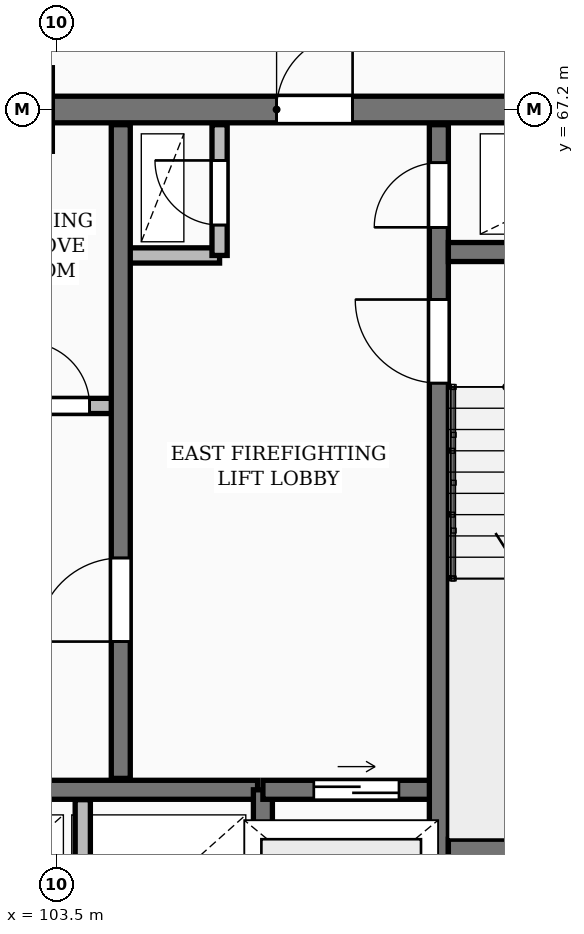
"""IFC4 building model, lengths in metres.
Left out: names, types, materials, properties, quantities, classifications, styles, units other than length and angle.
Written with IfcOpenShell. Run it as: python <this file> out.ifc"""

import sys

from ifc_helpers import new_model, si_unit, direction, frame, frame_2d, origin, place, context, subcontext, project, spatial, rectangle, extrude, element, fill, save


model = new_model("IFC4")
c1 = context("Model", 3, precision=1e-05, world=origin(), true_north=direction((0.0, 1.0)))
c2 = subcontext(c1, "Body", "Model", "MODEL_VIEW")
j1 = project(units=[si_unit("LENGTHUNIT", "METRE"), si_unit("PLANEANGLEUNIT", "RADIAN")], contexts=[c1])
p1 = place(None, origin())
s1 = spatial("IfcSite", under=j1, at=p1, CompositionType="ELEMENT")
p2 = place(p1, origin())
s2 = spatial("IfcBuilding", under=s1, at=p2, CompositionType="ELEMENT")
p3 = place(p2, frame((0.0, 0.0, -7.2)))
s3 = spatial("IfcBuildingStorey", under=s2, at=p3, CompositionType="ELEMENT", Elevation=-7.2)
p4 = place(p3, frame((75.95, 67.2, 0.0), z_axis=(0.0, 0.0, 1.0), x_axis=(1.0, 0.0, 0.0)))
e1 = element("IfcWall", 1, at=p4, inside=s3, PredefinedType="SHEAR", context=c2, shape_type="SweptSolid", body=[
    extrude(rectangle(XDim=36.3, YDim=0.35, at=frame_2d((18.15, 0.0))), origin(), (0.0, 0.0, 1.0), 3.6),
])
p5 = place(p4, frame((5.25, 0.0, 0.0)))
e2 = element("IfcOpeningElement", 2, at=p5, cuts=e1, PredefinedType="OPENING", context=c2, shape_type="SweptSolid", body=[
    extrude(rectangle(XDim=1.0, YDim=2.15, at=frame_2d((0.5, 1.075))), frame((0.0, 0.185, 0.0), z_axis=(0.0, -1.0, 0.0), x_axis=(1.0, 0.0, 0.0)), (0.0, 0.0, 1.0), 0.37),
])
p6 = place(p4, frame((21.6, 0.0, 0.0)))
e3 = element("IfcOpeningElement", 3, at=p6, cuts=e1, PredefinedType="OPENING", context=c2, shape_type="SweptSolid", body=[
    extrude(rectangle(XDim=1.5, YDim=2.2, at=frame_2d((0.75, 1.1))), frame((0.0, 0.185, 0.0), z_axis=(0.0, -1.0, 0.0), x_axis=(1.0, 0.0, 0.0)), (0.0, 0.0, 1.0), 0.37),
])
p7 = place(p4, frame((30.45, 0.0, 0.0)))
e4 = element("IfcOpeningElement", 4, at=p7, cuts=e1, PredefinedType="OPENING", context=c2, shape_type="SweptSolid", body=[
    extrude(rectangle(XDim=1.0, YDim=2.15, at=frame_2d((0.5, 1.075))), frame((0.0, 0.185, 0.0), z_axis=(0.0, -1.0, 0.0), x_axis=(1.0, 0.0, 0.0)), (0.0, 0.0, 1.0), 0.37),
])
p8 = place(p3, frame((103.85, 55.4, 0.0), z_axis=(0.0, 0.0, 1.0), x_axis=(0.0, 1.0, 0.0)))
e5 = element("IfcWall", 5, at=p8, inside=s3, PredefinedType="PARTITIONING", context=c2, shape_type="SweptSolid", body=[
    extrude(rectangle(XDim=2.72, YDim=0.2, at=frame_2d((1.36, 0.0))), origin(), (0.0, 0.0, 1.0), 3.3),
])
p9 = place(p3, frame((101.55, 58.25, 0.0), z_axis=(0.0, 0.0, 1.0), x_axis=(1.0, 0.0, 0.0)))
e6 = element("IfcWall", 6, at=p9, inside=s3, PredefinedType="SHEAR", context=c2, shape_type="SweptSolid", body=[
    extrude(rectangle(XDim=4.6, YDim=0.25, at=frame_2d((2.3, 0.0))), origin(), (0.0, 0.0, 1.0), 3.6),
])
p10 = place(p3, frame((106.22, 55.4, 0.0), z_axis=(0.0, 0.0, 1.0), x_axis=(0.0, 1.0, 0.0)))
e7 = element("IfcWall", 7, at=p10, inside=s3, PredefinedType="SHEAR", context=c2, shape_type="SweptSolid", body=[
    extrude(rectangle(XDim=2.85, YDim=0.25, at=frame_2d((1.425, 0.0))), origin(), (0.0, 0.0, 1.0), 3.6),
])
p11 = place(p3, frame((106.22, 58.25, 0.0), z_axis=(0.0, 0.0, 1.0), x_axis=(1.0, 0.0, 0.0)))
e8 = element("IfcWall", 8, at=p11, inside=s3, PredefinedType="SHEAR", context=c2, shape_type="SweptSolid", body=[
    extrude(rectangle(XDim=2.46, YDim=0.25, at=frame_2d((1.23, 0.0))), origin(), (0.0, 0.0, 1.0), 3.6),
])
p12 = place(p11, frame((0.67, 0.0, 0.0)))
e9 = element("IfcOpeningElement", 9, at=p12, cuts=e8, PredefinedType="OPENING", context=c2, shape_type="SweptSolid", body=[
    extrude(rectangle(XDim=1.12, YDim=2.12, at=frame_2d((0.56, 1.06))), frame((0.0, 0.135, 0.0), z_axis=(0.0, -1.0, 0.0), x_axis=(1.0, 0.0, 0.0)), (0.0, 0.0, 1.0), 0.27),
])
p13 = place(p3, frame((84.42, 63.3, 0.0), z_axis=(0.0, 0.0, 1.0), x_axis=(1.0, 0.0, 0.0)))
e10 = element("IfcWall", 10, at=p13, inside=s3, PredefinedType="PARTITIONING", context=c2, shape_type="SweptSolid", body=[
    extrude(rectangle(XDim=19.83, YDim=0.2, at=frame_2d((9.915, 0.0))), origin(), (0.0, 0.0, 1.0), 3.3),
])
p14 = place(p13, frame((1.15, 0.0, 0.0)))
e11 = element("IfcOpeningElement", 11, at=p14, cuts=e10, PredefinedType="OPENING", context=c2, shape_type="SweptSolid", body=[
    extrude(rectangle(XDim=0.85, YDim=2.05, at=frame_2d((0.425, 1.025))), frame((0.0, 0.11, 0.0), z_axis=(0.0, -1.0, 0.0), x_axis=(1.0, 0.0, 0.0)), (0.0, 0.0, 1.0), 0.22),
])
p15 = place(p13, frame((3.25, 0.0, 0.0)))
e12 = element("IfcOpeningElement", 12, at=p15, cuts=e10, PredefinedType="OPENING", context=c2, shape_type="SweptSolid", body=[
    extrude(rectangle(XDim=0.85, YDim=2.05, at=frame_2d((0.425, 1.025))), frame((0.0, 0.11, 0.0), z_axis=(0.0, -1.0, 0.0), x_axis=(1.0, 0.0, 0.0)), (0.0, 0.0, 1.0), 0.22),
])
p16 = place(p13, frame((13.08, 0.0, 0.0)))
e13 = element("IfcOpeningElement", 13, at=p16, cuts=e10, PredefinedType="OPENING", context=c2, shape_type="SweptSolid", body=[
    extrude(rectangle(XDim=1.5, YDim=2.2, at=frame_2d((0.75, 1.1))), frame((0.0, 0.11, 0.0), z_axis=(0.0, -1.0, 0.0), x_axis=(1.0, 0.0, 0.0)), (0.0, 0.0, 1.0), 0.22),
])
p17 = place(p13, frame((5.53, 0.0, 0.0)))
e14 = element("IfcOpeningElement", 14, at=p17, cuts=e10, PredefinedType="OPENING", context=c2, shape_type="SweptSolid", body=[
    extrude(rectangle(XDim=0.88, YDim=2.06, at=frame_2d((0.44, 1.03))), frame((0.0, 0.11, 0.0), z_axis=(0.0, -1.0, 0.0), x_axis=(1.0, 0.0, 0.0)), (0.0, 0.0, 1.0), 0.22),
])
p18 = place(p13, frame((7.68, 0.0, 0.0)))
e15 = element("IfcOpeningElement", 15, at=p18, cuts=e10, PredefinedType="OPENING", context=c2, shape_type="SweptSolid", body=[
    extrude(rectangle(XDim=0.88, YDim=2.06, at=frame_2d((0.44, 1.03))), frame((0.0, 0.11, 0.0), z_axis=(0.0, -1.0, 0.0), x_axis=(1.0, 0.0, 0.0)), (0.0, 0.0, 1.0), 0.22),
])
p19 = place(p13, frame((10.43, 0.0, 0.0)))
e16 = element("IfcOpeningElement", 16, at=p19, cuts=e10, PredefinedType="OPENING", context=c2, shape_type="SweptSolid", body=[
    extrude(rectangle(XDim=0.85, YDim=2.05, at=frame_2d((0.425, 1.025))), frame((0.0, 0.11, 0.0), z_axis=(0.0, -1.0, 0.0), x_axis=(1.0, 0.0, 0.0)), (0.0, 0.0, 1.0), 0.22),
])
p20 = place(p13, frame((16.23, 0.0, 0.0)))
e17 = element("IfcOpeningElement", 17, at=p20, cuts=e10, PredefinedType="OPENING", context=c2, shape_type="SweptSolid", body=[
    extrude(rectangle(XDim=0.96, YDim=2.1, at=frame_2d((0.48, 1.05))), frame((0.0, 0.11, 0.0), z_axis=(0.0, -1.0, 0.0), x_axis=(1.0, 0.0, 0.0)), (0.0, 0.0, 1.0), 0.22),
])
p21 = place(p13, frame((18.68, 0.0, 0.0)))
e18 = element("IfcOpeningElement", 18, at=p21, cuts=e10, PredefinedType="OPENING", context=c2, shape_type="SweptSolid", body=[
    extrude(rectangle(XDim=0.84, YDim=2.04, at=frame_2d((0.42, 1.02))), frame((0.0, 0.11, 0.0), z_axis=(0.0, -1.0, 0.0), x_axis=(1.0, 0.0, 0.0)), (0.0, 0.0, 1.0), 0.22),
])
p22 = place(p3, frame((104.45, 65.28, 0.0), z_axis=(0.0, 0.0, 1.0), x_axis=(1.0, 0.0, 0.0)))
e19 = element("IfcWall", 19, at=p22, inside=s3, PredefinedType="PARTITIONING", context=c2, shape_type="SweptSolid", body=[
    extrude(rectangle(XDim=1.2, YDim=0.2, at=frame_2d((0.6, 0.0))), origin(), (0.0, 0.0, 1.0), 3.3),
])
p23 = place(p3, frame((105.65, 65.28, 0.0), z_axis=(0.0, 0.0, 1.0), x_axis=(0.0, 1.0, 0.0)))
e20 = element("IfcWall", 20, at=p23, inside=s3, PredefinedType="PARTITIONING", context=c2, shape_type="SweptSolid", body=[
    extrude(rectangle(XDim=1.72, YDim=0.2, at=frame_2d((0.86, 0.0))), origin(), (0.0, 0.0, 1.0), 3.3),
])
p24 = place(p23, frame((0.4, 0.0, 0.0)))
e21 = element("IfcOpeningElement", 21, at=p24, cuts=e20, PredefinedType="OPENING", context=c2, shape_type="SweptSolid", body=[
    extrude(rectangle(XDim=0.85, YDim=2.05, at=frame_2d((0.425, 1.025))), frame((0.0, 0.11, 0.0), z_axis=(0.0, -1.0, 0.0), x_axis=(1.0, 0.0, 0.0)), (0.0, 0.0, 1.0), 0.22),
])
p25 = place(p3, frame((104.35, 58.4, 0.0), z_axis=(0.0, 0.0, 1.0), x_axis=(0.0, 1.0, 0.0)))
e22 = element("IfcWall", 22, at=p25, inside=s3, PredefinedType="SHEAR", context=c2, shape_type="SweptSolid", body=[
    extrude(rectangle(XDim=8.6, YDim=0.25, at=frame_2d((4.3, 0.0))), origin(), (0.0, 0.0, 1.0), 3.6),
])
p26 = place(p25, frame((1.8, 0.0, 0.0)))
e23 = element("IfcOpeningElement", 23, at=p26, cuts=e22, PredefinedType="OPENING", context=c2, shape_type="SweptSolid", body=[
    extrude(rectangle(XDim=1.1, YDim=2.1, at=frame_2d((0.55, 1.05))), frame((0.0, 0.135, 0.0), z_axis=(0.0, -1.0, 0.0), x_axis=(1.0, 0.0, 0.0)), (0.0, 0.0, 1.0), 0.27),
])
p27 = place(p3, frame((108.535, 55.4, 0.0), z_axis=(0.0, 0.0, 1.0), x_axis=(0.0, 1.0, 0.0)))
e24 = element("IfcWall", 24, at=p27, inside=s3, PredefinedType="SHEAR", context=c2, shape_type="SweptSolid", body=[
    extrude(rectangle(XDim=11.6, YDim=0.25, at=frame_2d((5.8, 0.0))), origin(), (0.0, 0.0, 1.0), 3.6),
])
p28 = place(p27, frame((8.2, 0.0, 0.0)))
e25 = element("IfcOpeningElement", 25, at=p28, cuts=e24, PredefinedType="OPENING", context=c2, shape_type="SweptSolid", body=[
    extrude(rectangle(XDim=1.1, YDim=2.1, at=frame_2d((0.55, 1.05))), frame((0.0, 0.135, 0.0), z_axis=(0.0, -1.0, 0.0), x_axis=(1.0, 0.0, 0.0)), (0.0, 0.0, 1.0), 0.27),
])
p29 = place(p27, frame((10.25, 0.0, 0.0)))
e26 = element("IfcOpeningElement", 26, at=p29, cuts=e24, PredefinedType="OPENING", context=c2, shape_type="SweptSolid", body=[
    extrude(rectangle(XDim=0.85, YDim=2.05, at=frame_2d((0.425, 1.025))), frame((0.0, 0.135, 0.0), z_axis=(0.0, -1.0, 0.0), x_axis=(1.0, 0.0, 0.0)), (0.0, 0.0, 1.0), 0.27),
])
for number, where, z_axis, x_axis in (
    (27, (108.66, 57.475, 0.0), (0.0, 0.0, 1.0), (1.0, 0.0, 0.0)),
    (28, (108.66, 65.325, 0.0), (0.0, 0.0, 1.0), (1.0, 0.0, 0.0)),
):
    element("IfcWall", number, at=place(p3, frame(where, z_axis=z_axis, x_axis=x_axis)), inside=s3, PredefinedType="SHEAR", context=c2, shape_type="SweptSolid", body=[
        extrude(rectangle(XDim=3.24, YDim=0.25, at=frame_2d((1.62, 0.0))), origin(), (0.0, 0.0, 1.0), 3.6),
    ])
p30 = place(p7, origin())
e29 = element("IfcDoor", 29, at=p30, inside=s3, OperationType="SINGLE_SWING_RIGHT", PredefinedType="DOOR", context=c2, shape_type="SweptSolid", body=[
    extrude(rectangle(XDim=1.0, YDim=2.15, at=frame_2d((0.5, 1.075))), frame((0.0, 0.025, 0.0), z_axis=(0.0, -1.0, 0.0), x_axis=(1.0, 0.0, 0.0)), (0.0, 0.0, 1.0), 0.05),
])
fill(e4, e29)
p31 = place(p12, origin())
e30 = element("IfcDoor", 30, at=p31, inside=s3, OperationType="SLIDING_TO_RIGHT", PredefinedType="DOOR", context=c2, shape_type="SweptSolid", body=[
    extrude(rectangle(XDim=1.12, YDim=2.12, at=frame_2d((0.56, 1.06))), frame((0.0, 0.025, 0.0), z_axis=(0.0, -1.0, 0.0), x_axis=(1.0, 0.0, 0.0)), (0.0, 0.0, 1.0), 0.05),
])
fill(e9, e30)
p32 = place(p21, origin())
e31 = element("IfcDoor", 31, at=p32, inside=s3, OperationType="SINGLE_SWING_LEFT", PredefinedType="DOOR", context=c2, shape_type="SweptSolid", body=[
    extrude(rectangle(XDim=0.84, YDim=2.04, at=frame_2d((0.42, 1.02))), frame((0.0, 0.025, 0.0), z_axis=(0.0, -1.0, 0.0), x_axis=(1.0, 0.0, 0.0)), (0.0, 0.0, 1.0), 0.05),
])
fill(e18, e31)
p33 = place(p24, origin())
e32 = element("IfcDoor", 32, at=p33, inside=s3, OperationType="SINGLE_SWING_RIGHT", PredefinedType="DOOR", context=c2, shape_type="SweptSolid", body=[
    extrude(rectangle(XDim=0.85, YDim=2.05, at=frame_2d((0.425, 1.025))), frame((0.0, 0.025, 0.0), z_axis=(0.0, -1.0, 0.0), x_axis=(1.0, 0.0, 0.0)), (0.0, 0.0, 1.0), 0.05),
])
fill(e21, e32)
p34 = place(p26, origin())
e33 = element("IfcDoor", 33, at=p34, inside=s3, OperationType="SINGLE_SWING_LEFT", PredefinedType="DOOR", context=c2, shape_type="SweptSolid", body=[
    extrude(rectangle(XDim=1.1, YDim=2.1, at=frame_2d((0.55, 1.05))), frame((0.0, 0.025, 0.0), z_axis=(0.0, -1.0, 0.0), x_axis=(1.0, 0.0, 0.0)), (0.0, 0.0, 1.0), 0.05),
])
fill(e23, e33)
p35 = place(p28, origin())
e34 = element("IfcDoor", 34, at=p35, inside=s3, OperationType="SINGLE_SWING_RIGHT", PredefinedType="DOOR", context=c2, shape_type="SweptSolid", body=[
    extrude(rectangle(XDim=1.1, YDim=2.1, at=frame_2d((0.55, 1.05))), frame((0.0, 0.025, 0.0), z_axis=(0.0, -1.0, 0.0), x_axis=(1.0, 0.0, 0.0)), (0.0, 0.0, 1.0), 0.05),
])
fill(e25, e34)
p36 = place(p29, origin())
e35 = element("IfcDoor", 35, at=p36, inside=s3, OperationType="SINGLE_SWING_LEFT", PredefinedType="DOOR", context=c2, shape_type="SweptSolid", body=[
    extrude(rectangle(XDim=0.85, YDim=2.05, at=frame_2d((0.425, 1.025))), frame((0.0, 0.025, 0.0), z_axis=(0.0, -1.0, 0.0), x_axis=(1.0, 0.0, 0.0)), (0.0, 0.0, 1.0), 0.05),
])
fill(e26, e35)
save(model, sys.argv[1])
